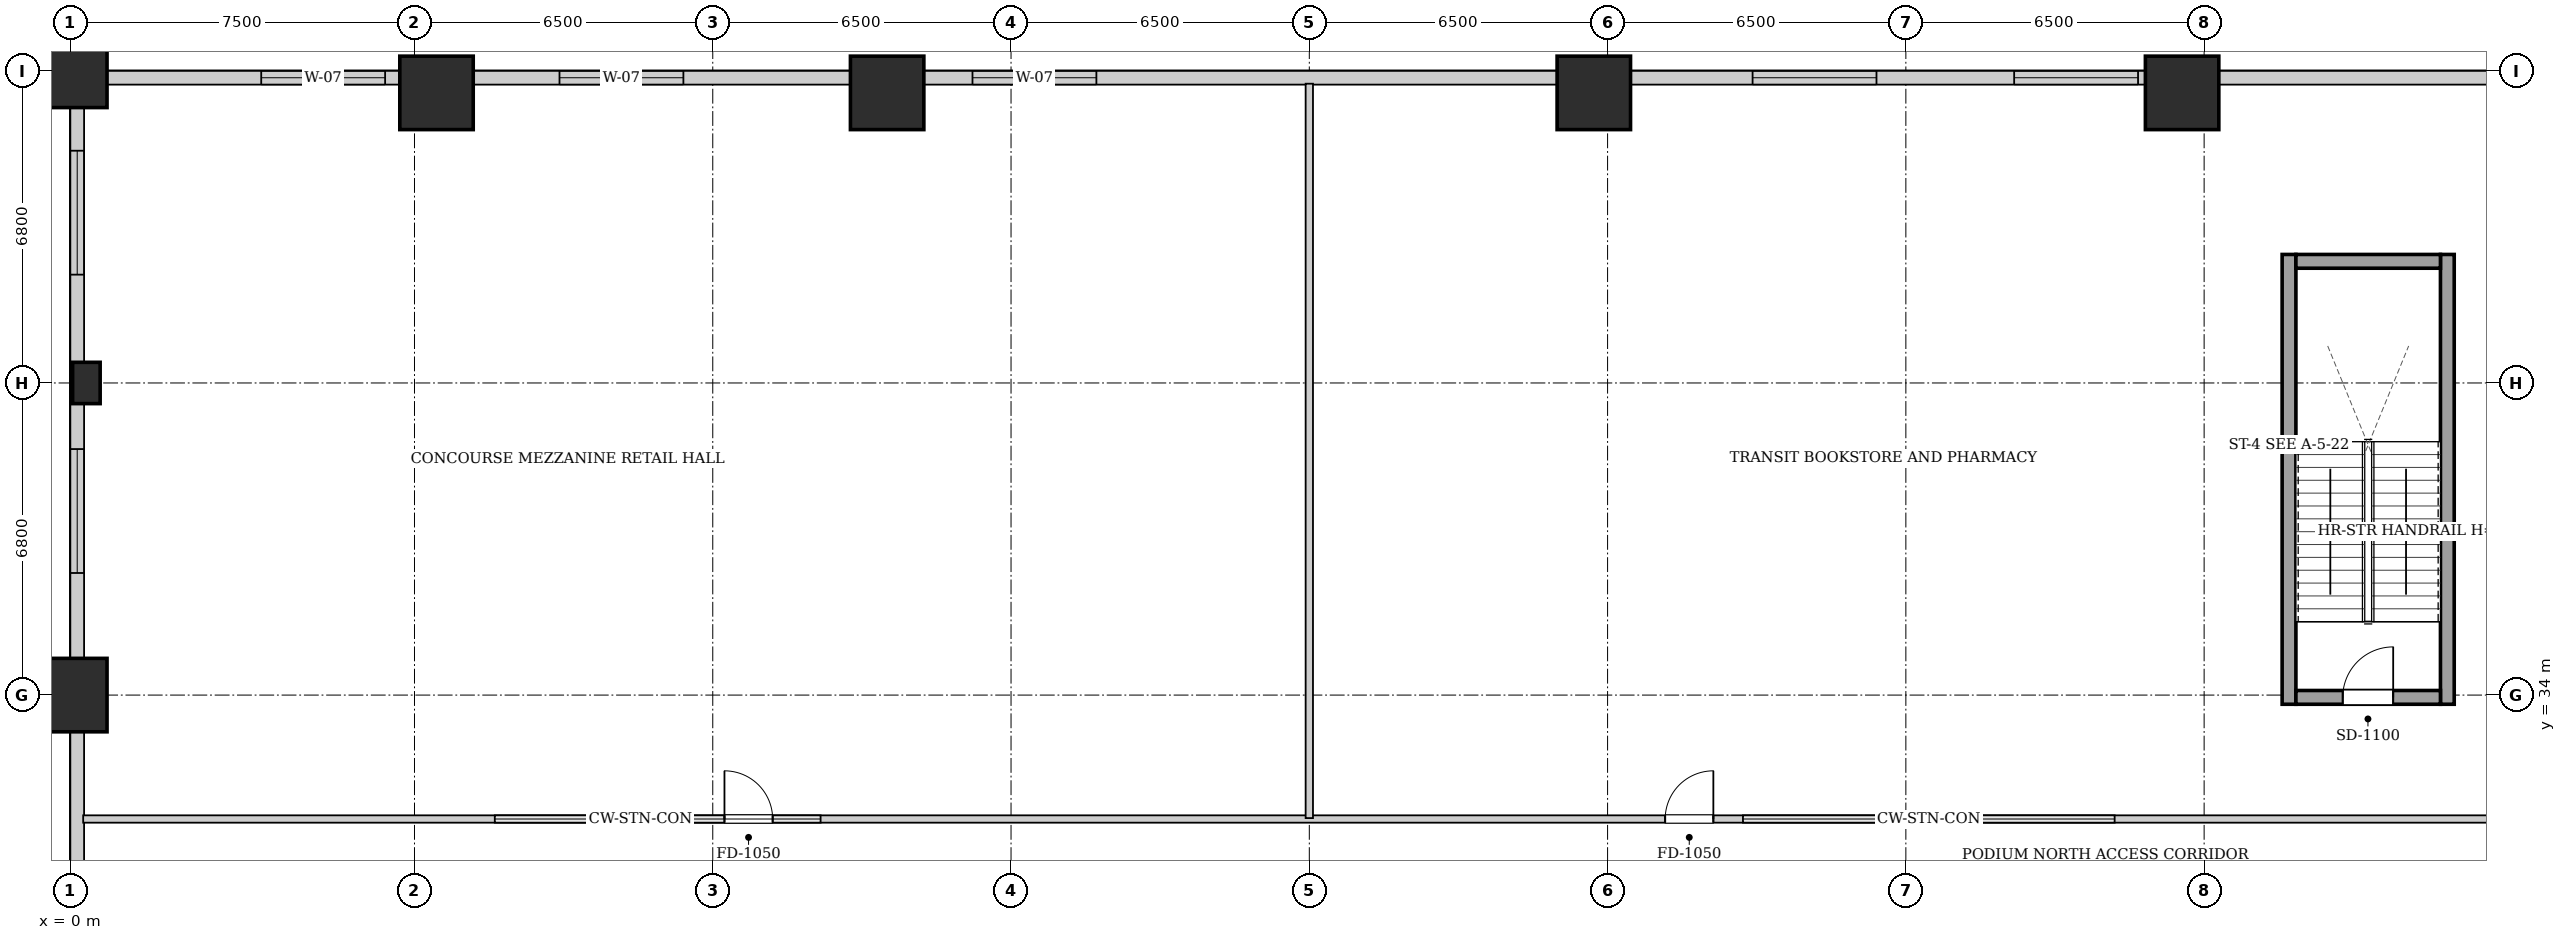
"""IFC4 building model, lengths in metres.
Left out: names, types, materials, properties, quantities, classifications, styles, units other than length and angle.
Written with IfcOpenShell. Run it as: python <this file> out.ifc"""

import sys

from ifc_helpers import new_model, si_unit, direction, frame, frame_2d, origin, origin_2d, place, context, subcontext, project, spatial, rectangle, extrude, element, fill, save


model = new_model("IFC4")
c1 = context("Model", 3, precision=1e-05, world=origin(), true_north=direction((0.0, 1.0)))
c2 = subcontext(c1, "Body", "Model", "MODEL_VIEW")
j1 = project(units=[si_unit("LENGTHUNIT", "METRE"), si_unit("PLANEANGLEUNIT", "RADIAN")], contexts=[c1])
p1 = place(None, origin())
s1 = spatial("IfcSite", under=j1, at=p1, CompositionType="ELEMENT")
p2 = place(p1, origin())
s2 = spatial("IfcBuilding", under=s1, at=p2, CompositionType="ELEMENT")
p3 = place(p2, frame((0.0, 0.0, 6.0)))
s3 = spatial("IfcBuildingStorey", under=s2, at=p3, CompositionType="ELEMENT", Elevation=6.0)
for number, where, z_axis, x_axis in (
    (1, (0.0, 34.0, 0.0), (0.0, 0.0, 1.0), (1.0, 0.0, 0.0)),
    (2, (0.0, 47.6, 0.0), (0.0, 0.0, 1.0), (1.0, 0.0, 0.0)),
    (3, (7.98, 47.12, 0.0), (0.0, 0.0, 1.0), (1.0, 0.0, 0.0)),
    (4, (46.02, 47.12, 0.0), (0.0, 0.0, 1.0), (1.0, 0.0, 0.0)),
    (5, (17.8, 47.12, 0.0), (0.0, 0.0, 1.0), (1.0, 0.0, 0.0)),
    (6, (33.2, 47.12, 0.0), (0.0, 0.0, 1.0), (1.0, 0.0, 0.0)),
):
    element("IfcColumn", number, at=place(p3, frame(where, z_axis=z_axis, x_axis=x_axis)), inside=s3, PredefinedType="COLUMN", context=c2, shape_type="SweptSolid", body=[
        extrude(rectangle(XDim=1.6, YDim=1.6, at=origin_2d()), origin(), (0.0, 0.0, 1.0), 5.2),
    ])
p4 = place(p3, frame((0.35, 40.8, 0.0), z_axis=(0.0, 0.0, 1.0), x_axis=(1.0, 0.0, 0.0)))
e7 = element("IfcColumn", 7, at=p4, inside=s3, PredefinedType="PILASTER", context=c2, shape_type="SweptSolid", body=[
    extrude(rectangle(XDim=0.6, YDim=0.9, at=origin_2d()), origin(), (0.0, 0.0, 1.0), 5.2),
])
p5 = place(p3, frame((0.16, 47.45, 0.0), z_axis=(0.0, 0.0, 1.0), x_axis=(1.0, 0.0, 0.0)))
e8 = element("IfcWall", 8, at=p5, inside=s3, PredefinedType="SOLIDWALL", context=c2, shape_type="SweptSolid", body=[
    extrude(rectangle(XDim=53.68, YDim=0.3, at=frame_2d((26.84, 0.0))), origin(), (0.0, 0.0, 1.0), 3.765),
])
p6 = place(p5, frame((4.0, 0.0, 0.9)))
e9 = element("IfcOpeningElement", 9, at=p6, cuts=e8, PredefinedType="OPENING", context=c2, shape_type="SweptSolid", body=[
    extrude(rectangle(XDim=2.7, YDim=2.1, at=frame_2d((1.35, 1.05))), frame((0.0, 0.16, 0.0), z_axis=(0.0, -1.0, 0.0), x_axis=(1.0, 0.0, 0.0)), (0.0, 0.0, 1.0), 0.32),
])
p7 = place(p5, frame((10.5, 0.0, 0.9)))
e10 = element("IfcOpeningElement", 10, at=p7, cuts=e8, PredefinedType="OPENING", context=c2, shape_type="SweptSolid", body=[
    extrude(rectangle(XDim=2.7, YDim=2.1, at=frame_2d((1.35, 1.05))), frame((0.0, 0.16, 0.0), z_axis=(0.0, -1.0, 0.0), x_axis=(1.0, 0.0, 0.0)), (0.0, 0.0, 1.0), 0.32),
])
p8 = place(p5, frame((19.5, 0.0, 0.9)))
e11 = element("IfcOpeningElement", 11, at=p8, cuts=e8, PredefinedType="OPENING", context=c2, shape_type="SweptSolid", body=[
    extrude(rectangle(XDim=2.7, YDim=2.1, at=frame_2d((1.35, 1.05))), frame((0.0, 0.16, 0.0), z_axis=(0.0, -1.0, 0.0), x_axis=(1.0, 0.0, 0.0)), (0.0, 0.0, 1.0), 0.32),
])
p9 = place(p5, frame((36.5, 0.0, 0.9)))
e12 = element("IfcOpeningElement", 12, at=p9, cuts=e8, PredefinedType="OPENING", context=c2, shape_type="SweptSolid", body=[
    extrude(rectangle(XDim=2.7, YDim=2.1, at=frame_2d((1.35, 1.05))), frame((0.0, 0.16, 0.0), z_axis=(0.0, -1.0, 0.0), x_axis=(1.0, 0.0, 0.0)), (0.0, 0.0, 1.0), 0.32),
])
p10 = place(p5, frame((42.2, 0.0, 0.9)))
e13 = element("IfcOpeningElement", 13, at=p10, cuts=e8, PredefinedType="OPENING", context=c2, shape_type="SweptSolid", body=[
    extrude(rectangle(XDim=2.7, YDim=2.1, at=frame_2d((1.35, 1.05))), frame((0.0, 0.16, 0.0), z_axis=(0.0, -1.0, 0.0), x_axis=(1.0, 0.0, 0.0)), (0.0, 0.0, 1.0), 0.32),
])
p11 = place(p3, frame((0.15, 0.16, 0.0), z_axis=(0.0, 0.0, 1.0), x_axis=(0.0, 1.0, 0.0)))
e14 = element("IfcWall", 14, at=p11, inside=s3, PredefinedType="SOLIDWALL", context=c2, shape_type="SweptSolid", body=[
    extrude(rectangle(XDim=47.28, YDim=0.3, at=frame_2d((23.64, 0.0))), origin(), (0.0, 0.0, 1.0), 3.765),
])
p12 = place(p11, frame((3.33, 0.0, 0.9)))
e15 = element("IfcOpeningElement", 15, at=p12, cuts=e14, PredefinedType="OPENING", context=c2, shape_type="SweptSolid", body=[
    extrude(rectangle(XDim=2.7, YDim=2.1, at=frame_2d((1.35, 1.05))), frame((0.0, 0.16, 0.0), z_axis=(0.0, -1.0, 0.0), x_axis=(1.0, 0.0, 0.0)), (0.0, 0.0, 1.0), 0.32),
])
p13 = place(p11, frame((9.34, 0.0, 0.9)))
e16 = element("IfcOpeningElement", 16, at=p13, cuts=e14, PredefinedType="OPENING", context=c2, shape_type="SweptSolid", body=[
    extrude(rectangle(XDim=2.7, YDim=2.1, at=frame_2d((1.35, 1.05))), frame((0.0, 0.16, 0.0), z_axis=(0.0, -1.0, 0.0), x_axis=(1.0, 0.0, 0.0)), (0.0, 0.0, 1.0), 0.32),
])
p14 = place(p11, frame((17.18, 0.0, 0.85)))
e17 = element("IfcOpeningElement", 17, at=p14, cuts=e14, PredefinedType="OPENING", context=c2, shape_type="SweptSolid", body=[
    extrude(rectangle(XDim=2.1, YDim=1.85, at=frame_2d((1.05, 0.925))), frame((0.0, 0.16, 0.0), z_axis=(0.0, -1.0, 0.0), x_axis=(1.0, 0.0, 0.0)), (0.0, 0.0, 1.0), 0.32),
])
p15 = place(p11, frame((36.5, 0.0, 0.9)))
e18 = element("IfcOpeningElement", 18, at=p15, cuts=e14, PredefinedType="OPENING", context=c2, shape_type="SweptSolid", body=[
    extrude(rectangle(XDim=2.7, YDim=2.1, at=frame_2d((1.35, 1.05))), frame((0.0, 0.16, 0.0), z_axis=(0.0, -1.0, 0.0), x_axis=(1.0, 0.0, 0.0)), (0.0, 0.0, 1.0), 0.32),
])
p16 = place(p11, frame((43.0, 0.0, 0.9)))
e19 = element("IfcOpeningElement", 19, at=p16, cuts=e14, PredefinedType="OPENING", context=c2, shape_type="SweptSolid", body=[
    extrude(rectangle(XDim=2.7, YDim=2.1, at=frame_2d((1.35, 1.05))), frame((0.0, 0.16, 0.0), z_axis=(0.0, -1.0, 0.0), x_axis=(1.0, 0.0, 0.0)), (0.0, 0.0, 1.0), 0.32),
])
for number, where, z_axis, x_axis in (
    (20, (48.35, 33.8, 0.0), (0.0, 0.0, 1.0), (0.0, 1.0, 0.0)),
    (21, (51.8, 33.8, 0.0), (0.0, 0.0, 1.0), (0.0, 1.0, 0.0)),
):
    element("IfcWall", number, at=place(p3, frame(where, z_axis=z_axis, x_axis=x_axis)), inside=s3, PredefinedType="SHEAR", context=c2, shape_type="SweptSolid", body=[
        extrude(rectangle(XDim=9.8, YDim=0.3, at=frame_2d((4.9, 0.0))), origin(), (0.0, 0.0, 1.0), 4.88),
    ])
p17 = place(p3, frame((48.5, 43.45, 0.0), z_axis=(0.0, 0.0, 1.0), x_axis=(1.0, 0.0, 0.0)))
e22 = element("IfcWall", 22, at=p17, inside=s3, PredefinedType="SHEAR", context=c2, shape_type="SweptSolid", body=[
    extrude(rectangle(XDim=3.15, YDim=0.3, at=frame_2d((1.575, 0.0))), origin(), (0.0, 0.0, 1.0), 4.88),
])
p18 = place(p3, frame((48.5, 33.95, 0.0), z_axis=(0.0, 0.0, 1.0), x_axis=(1.0, 0.0, 0.0)))
e23 = element("IfcWall", 23, at=p18, inside=s3, PredefinedType="SHEAR", context=c2, shape_type="SweptSolid", body=[
    extrude(rectangle(XDim=3.15, YDim=0.3, at=frame_2d((1.575, 0.0))), origin(), (0.0, 0.0, 1.0), 4.88),
])
p19 = place(p18, frame((1.02, 0.0, 0.0)))
e24 = element("IfcOpeningElement", 24, at=p19, cuts=e23, PredefinedType="OPENING", context=c2, shape_type="SweptSolid", body=[
    extrude(rectangle(XDim=1.1, YDim=2.05, at=frame_2d((0.55, 1.025))), frame((0.0, 0.16, 0.0), z_axis=(0.0, -1.0, 0.0), x_axis=(1.0, 0.0, 0.0)), (0.0, 0.0, 1.0), 0.32),
])
p20 = place(p3, frame((0.28, 31.3, 0.0), z_axis=(0.0, 0.0, 1.0), x_axis=(1.0, 0.0, 0.0)))
e25 = element("IfcWall", 25, at=p20, inside=s3, PredefinedType="PARTITIONING", context=c2, shape_type="SweptSolid", body=[
    extrude(rectangle(XDim=53.44, YDim=0.16, at=frame_2d((26.72, 0.0))), origin(), (0.0, 0.0, 1.0), 4.88),
])
p21 = place(p20, frame((13.975, 0.0, 0.0)))
e26 = element("IfcOpeningElement", 26, at=p21, cuts=e25, PredefinedType="OPENING", context=c2, shape_type="SweptSolid", body=[
    extrude(rectangle(XDim=1.05, YDim=2.05, at=frame_2d((0.525, 1.025))), frame((0.0, 0.09, 0.0), z_axis=(0.0, -1.0, 0.0), x_axis=(1.0, 0.0, 0.0)), (0.0, 0.0, 1.0), 0.18),
])
p22 = place(p20, frame((34.475, 0.0, 0.0)))
e27 = element("IfcOpeningElement", 27, at=p22, cuts=e25, PredefinedType="OPENING", context=c2, shape_type="SweptSolid", body=[
    extrude(rectangle(XDim=1.05, YDim=2.05, at=frame_2d((0.525, 1.025))), frame((0.0, 0.09, 0.0), z_axis=(0.0, -1.0, 0.0), x_axis=(1.0, 0.0, 0.0)), (0.0, 0.0, 1.0), 0.18),
])
p23 = place(p3, frame((27.0, 31.32, 0.0), z_axis=(0.0, 0.0, 1.0), x_axis=(0.0, 1.0, 0.0)))
e28 = element("IfcWall", 28, at=p23, inside=s3, PredefinedType="PARTITIONING", context=c2, shape_type="SweptSolid", body=[
    extrude(rectangle(XDim=16.0, YDim=0.16, at=frame_2d((8.0, 0.0))), origin(), (0.0, 0.0, 1.0), 4.88),
])
p24 = place(p19, origin())
e29 = element("IfcDoor", 29, at=p24, inside=s3, OperationType="SINGLE_SWING_RIGHT", PredefinedType="DOOR", context=c2, shape_type="SweptSolid", body=[
    extrude(rectangle(XDim=1.1, YDim=2.05, at=frame_2d((0.55, 1.025))), frame((0.0, 0.025, 0.0), z_axis=(0.0, -1.0, 0.0), x_axis=(1.0, 0.0, 0.0)), (0.0, 0.0, 1.0), 0.05),
])
fill(e24, e29)
p25 = place(p21, origin())
e30 = element("IfcDoor", 30, at=p25, inside=s3, OperationType="SINGLE_SWING_LEFT", PredefinedType="DOOR", context=c2, shape_type="SweptSolid", body=[
    extrude(rectangle(XDim=1.05, YDim=2.05, at=frame_2d((0.525, 1.025))), frame((0.0, 0.025, 0.0), z_axis=(0.0, -1.0, 0.0), x_axis=(1.0, 0.0, 0.0)), (0.0, 0.0, 1.0), 0.05),
])
fill(e26, e30)
p26 = place(p22, origin())
e31 = element("IfcDoor", 31, at=p26, inside=s3, OperationType="SINGLE_SWING_RIGHT", PredefinedType="DOOR", context=c2, shape_type="SweptSolid", body=[
    extrude(rectangle(XDim=1.05, YDim=2.05, at=frame_2d((0.525, 1.025))), frame((0.0, 0.025, 0.0), z_axis=(0.0, -1.0, 0.0), x_axis=(1.0, 0.0, 0.0)), (0.0, 0.0, 1.0), 0.05),
])
fill(e27, e31)
p27 = place(p6, origin())
e32 = element("IfcWindow", 32, at=p27, inside=s3, PartitioningType="TRIPLE_PANEL_VERTICAL", PredefinedType="WINDOW", context=c2, shape_type="SweptSolid", body=[
    extrude(rectangle(XDim=2.7, YDim=2.1, at=frame_2d((1.35, 1.05))), frame((0.0, 0.03, 0.0), z_axis=(0.0, -1.0, 0.0), x_axis=(1.0, 0.0, 0.0)), (0.0, 0.0, 1.0), 0.06),
])
fill(e9, e32)
p28 = place(p7, origin())
e33 = element("IfcWindow", 33, at=p28, inside=s3, PartitioningType="TRIPLE_PANEL_VERTICAL", PredefinedType="WINDOW", context=c2, shape_type="SweptSolid", body=[
    extrude(rectangle(XDim=2.7, YDim=2.1, at=frame_2d((1.35, 1.05))), frame((0.0, 0.03, 0.0), z_axis=(0.0, -1.0, 0.0), x_axis=(1.0, 0.0, 0.0)), (0.0, 0.0, 1.0), 0.06),
])
fill(e10, e33)
p29 = place(p8, origin())
e34 = element("IfcWindow", 34, at=p29, inside=s3, PartitioningType="TRIPLE_PANEL_VERTICAL", PredefinedType="WINDOW", context=c2, shape_type="SweptSolid", body=[
    extrude(rectangle(XDim=2.7, YDim=2.1, at=frame_2d((1.35, 1.05))), frame((0.0, 0.03, 0.0), z_axis=(0.0, -1.0, 0.0), x_axis=(1.0, 0.0, 0.0)), (0.0, 0.0, 1.0), 0.06),
])
fill(e11, e34)
p30 = place(p9, origin())
e35 = element("IfcWindow", 35, at=p30, inside=s3, PartitioningType="TRIPLE_PANEL_VERTICAL", PredefinedType="WINDOW", context=c2, shape_type="SweptSolid", body=[
    extrude(rectangle(XDim=2.7, YDim=2.1, at=frame_2d((1.35, 1.05))), frame((0.0, 0.03, 0.0), z_axis=(0.0, -1.0, 0.0), x_axis=(1.0, 0.0, 0.0)), (0.0, 0.0, 1.0), 0.06),
])
fill(e12, e35)
p31 = place(p10, origin())
e36 = element("IfcWindow", 36, at=p31, inside=s3, PartitioningType="TRIPLE_PANEL_VERTICAL", PredefinedType="WINDOW", context=c2, shape_type="SweptSolid", body=[
    extrude(rectangle(XDim=2.7, YDim=2.1, at=frame_2d((1.35, 1.05))), frame((0.0, 0.03, 0.0), z_axis=(0.0, -1.0, 0.0), x_axis=(1.0, 0.0, 0.0)), (0.0, 0.0, 1.0), 0.06),
])
fill(e13, e36)
p32 = place(p15, origin())
e37 = element("IfcWindow", 37, at=p32, inside=s3, PartitioningType="TRIPLE_PANEL_VERTICAL", PredefinedType="WINDOW", context=c2, shape_type="SweptSolid", body=[
    extrude(rectangle(XDim=2.7, YDim=2.1, at=frame_2d((1.35, 1.05))), frame((0.0, 0.03, 0.0), z_axis=(0.0, -1.0, 0.0), x_axis=(1.0, 0.0, 0.0)), (0.0, 0.0, 1.0), 0.06),
])
fill(e18, e37)
p33 = place(p16, origin())
e38 = element("IfcWindow", 38, at=p33, inside=s3, PartitioningType="TRIPLE_PANEL_VERTICAL", PredefinedType="WINDOW", context=c2, shape_type="SweptSolid", body=[
    extrude(rectangle(XDim=2.7, YDim=2.1, at=frame_2d((1.35, 1.05))), frame((0.0, 0.03, 0.0), z_axis=(0.0, -1.0, 0.0), x_axis=(1.0, 0.0, 0.0)), (0.0, 0.0, 1.0), 0.06),
])
fill(e19, e38)
save(model, sys.argv[1])
